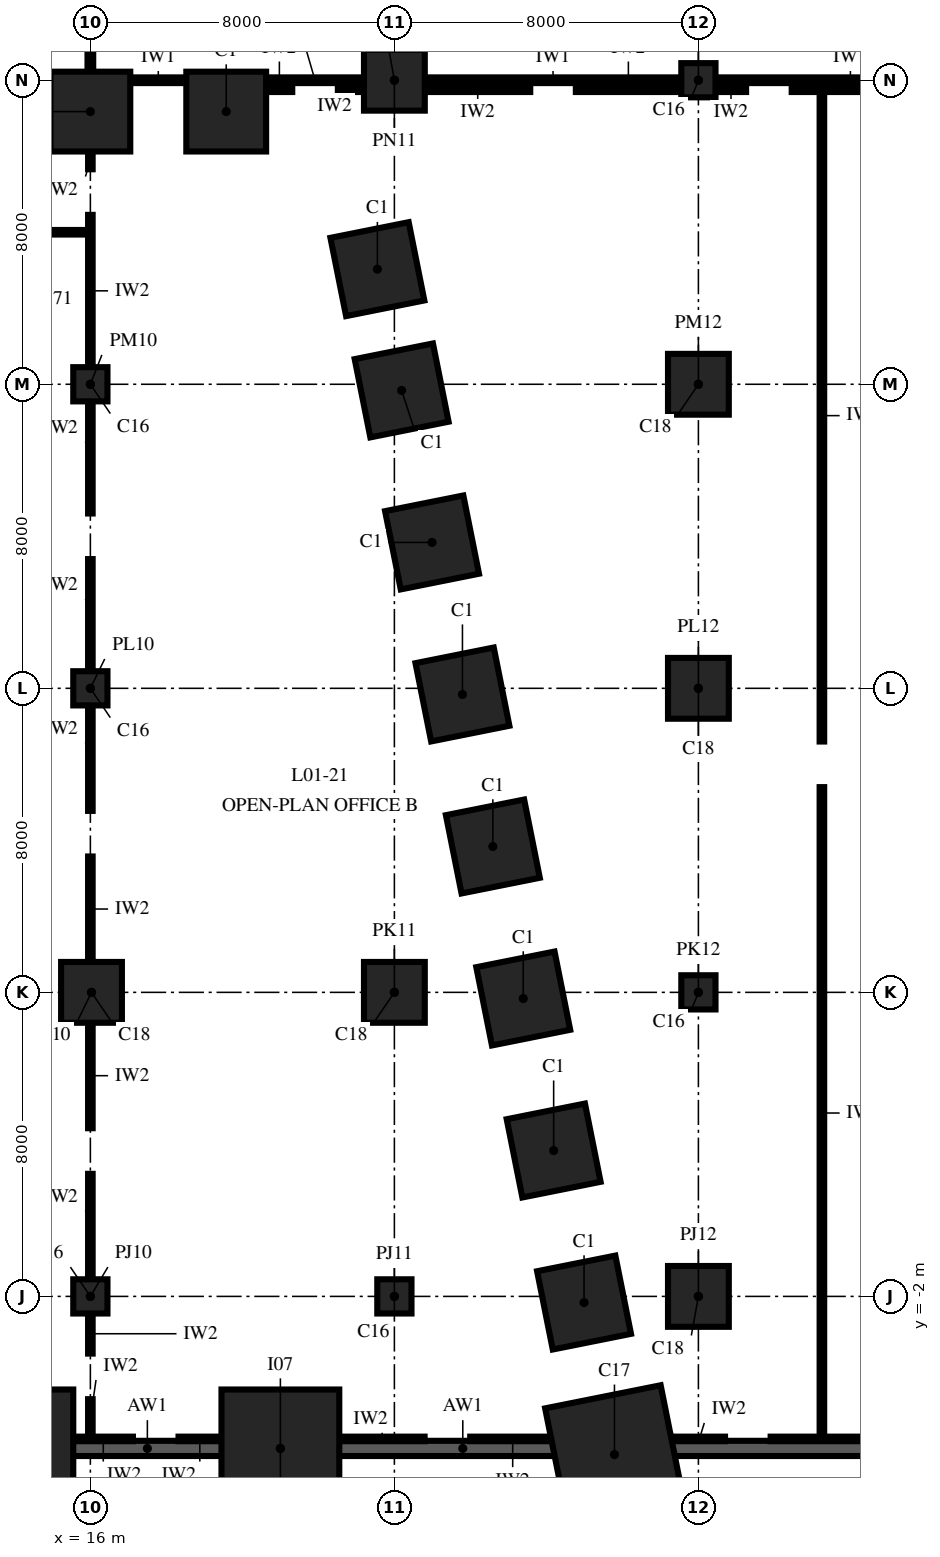
"""IFC4 building model, lengths in metres.
Left out: names, types, materials, properties, quantities, classifications, styles, units other than length and angle.
Written with IfcOpenShell. Run it as: python <this file> out.ifc"""

import sys

from ifc_helpers import new_model, si_unit, direction, frame, frame_2d, origin, origin_2d, place, context, subcontext, project, spatial, rectangle, extrude, element, save


model = new_model("IFC4")
c1 = context("Model", 3, precision=1e-05, world=origin(), true_north=direction((0.0, 1.0)))
c2 = subcontext(c1, "Body", "Model", "MODEL_VIEW")
j1 = project(units=[si_unit("LENGTHUNIT", "METRE"), si_unit("PLANEANGLEUNIT", "RADIAN")], contexts=[c1])
p1 = place(None, origin())
s1 = spatial("IfcSite", under=j1, at=p1, CompositionType="ELEMENT")
p2 = place(p1, origin())
s2 = spatial("IfcBuilding", under=s1, at=p2, CompositionType="ELEMENT")
p3 = place(p2, frame((0.0, 0.0, 6.0)))
s3 = spatial("IfcBuildingStorey", under=s2, at=p3, CompositionType="ELEMENT", Elevation=6.0)
p4 = place(p3, frame((29.791, -6.162, 0.0), z_axis=(0.0, 0.0, 1.0), x_axis=(-0.196116135138, 0.980580675691, 0.0)))
e1 = element("IfcColumn", 1, at=p4, inside=s3, PredefinedType="COLUMN", context=c2, shape_type="SweptSolid", body=[
    extrude(rectangle(XDim=3.1, YDim=3.1, at=origin_2d()), origin(), (0.0, 0.0, 1.0), 6.0),
])
for number, where, z_axis, x_axis in (
    (2, (28.991, -2.162, 0.0), (0.0, 0.0, 1.0), (-0.196, 0.981, 0.0)),
    (3, (28.191, 1.838, 0.0), (0.0, 0.0, 1.0), (-0.196, 0.981, 0.0)),
    (4, (27.391, 5.838, 0.0), (0.0, 0.0, 1.0), (-0.196, 0.981, 0.0)),
    (5, (26.591, 9.838, 0.0), (0.0, 0.0, 1.0), (-0.196, 0.981, 0.0)),
    (6, (25.791, 13.838, 0.0), (0.0, 0.0, 1.0), (-0.196, 0.981, 0.0)),
    (7, (24.991, 17.838, 0.0), (0.0, 0.0, 1.0), (-0.196, 0.981, 0.0)),
    (8, (24.191, 21.838, 0.0), (0.0, 0.0, 1.0), (-0.196, 0.981, 0.0)),
    (9, (23.553, 25.029, 0.0), (0.0, 0.0, 1.0), (-0.196, 0.981, 0.0)),
    (10, (19.575, 29.175, 0.0), (0.0, 0.0, 1.0), (-1.0, 0.0, 0.0)),
    (11, (16.0, 29.175, 0.0), (0.0, 0.0, 1.0), (-1.0, 0.0, 0.0)),
):
    element("IfcColumn", number, at=place(p3, frame(where, z_axis=z_axis, x_axis=x_axis)), inside=s3, PredefinedType="COLUMN", context=c2, shape_type="SweptSolid", body=[
        extrude(rectangle(XDim=2.1, YDim=2.1, at=origin_2d()), origin(), (0.0, 0.0, 1.0), 6.0),
    ])
for number, where, z_axis, x_axis in (
    (12, (14.0, -6.0, 0.0), (0.0, 0.0, 1.0), (1.0, 0.0, 0.0)),
    (13, (21.0, -6.0, 0.0), (0.0, 0.0, 1.0), (1.0, 0.0, 0.0)),
):
    element("IfcColumn", number, at=place(p3, frame(where, z_axis=z_axis, x_axis=x_axis)), inside=s3, PredefinedType="COLUMN", context=c2, shape_type="SweptSolid", body=[
        extrude(rectangle(XDim=3.1, YDim=3.1, at=origin_2d()), origin(), (0.0, 0.0, 1.0), 6.0),
    ])
p5 = place(p3, frame((16.0, -2.0, 0.0), z_axis=(0.0, 0.0, 1.0), x_axis=(1.0, 0.0, 0.0)))
e14 = element("IfcColumn", 14, at=p5, inside=s3, PredefinedType="COLUMN", context=c2, shape_type="SweptSolid", body=[
    extrude(rectangle(XDim=0.9, YDim=0.9, at=origin_2d()), origin(), (0.0, 0.0, 1.0), 6.0),
])
p6 = place(p3, frame((16.03, 6.0, 0.0), z_axis=(0.0, 0.0, 1.0), x_axis=(1.0, 0.0, 0.0)))
e15 = element("IfcColumn", 15, at=p6, inside=s3, PredefinedType="COLUMN", context=c2, shape_type="SweptSolid", body=[
    extrude(rectangle(XDim=1.6, YDim=1.6, at=origin_2d()), origin(), (0.0, 0.0, 1.0), 6.0),
])
for number, where, z_axis, x_axis in (
    (16, (16.0, 14.0, 0.0), (0.0, 0.0, 1.0), (1.0, 0.0, 0.0)),
    (17, (16.0, 22.0, 0.0), (0.0, 0.0, 1.0), (1.0, 0.0, 0.0)),
    (18, (24.0, -2.0, 0.0), (0.0, 0.0, 1.0), (1.0, 0.0, 0.0)),
):
    element("IfcColumn", number, at=place(p3, frame(where, z_axis=z_axis, x_axis=x_axis)), inside=s3, PredefinedType="COLUMN", context=c2, shape_type="SweptSolid", body=[
        extrude(rectangle(XDim=0.9, YDim=0.9, at=origin_2d()), origin(), (0.0, 0.0, 1.0), 6.0),
    ])
for number, where, z_axis, x_axis in (
    (19, (24.0, 6.0, 0.0), (0.0, 0.0, 1.0), (1.0, 0.0, 0.0)),
    (20, (24.0, 30.0, 0.0), (0.0, 0.0, 1.0), (1.0, 0.0, 0.0)),
    (21, (32.0, -2.0, 0.0), (0.0, 0.0, 1.0), (1.0, 0.0, 0.0)),
):
    element("IfcColumn", number, at=place(p3, frame(where, z_axis=z_axis, x_axis=x_axis)), inside=s3, PredefinedType="COLUMN", context=c2, shape_type="SweptSolid", body=[
        extrude(rectangle(XDim=1.6, YDim=1.6, at=origin_2d()), origin(), (0.0, 0.0, 1.0), 6.0),
    ])
p7 = place(p3, frame((32.0, 6.0, 0.0), z_axis=(0.0, 0.0, 1.0), x_axis=(1.0, 0.0, 0.0)))
e22 = element("IfcColumn", 22, at=p7, inside=s3, PredefinedType="COLUMN", context=c2, shape_type="SweptSolid", body=[
    extrude(rectangle(XDim=0.9, YDim=0.9, at=origin_2d()), origin(), (0.0, 0.0, 1.0), 6.0),
])
for number, where, z_axis, x_axis in (
    (23, (32.0, 14.0, 0.0), (0.0, 0.0, 1.0), (1.0, 0.0, 0.0)),
    (24, (32.0, 22.0, 0.0), (0.0, 0.0, 1.0), (1.0, 0.0, 0.0)),
):
    element("IfcColumn", number, at=place(p3, frame(where, z_axis=z_axis, x_axis=x_axis)), inside=s3, PredefinedType="COLUMN", context=c2, shape_type="SweptSolid", body=[
        extrude(rectangle(XDim=1.6, YDim=1.6, at=origin_2d()), origin(), (0.0, 0.0, 1.0), 6.0),
    ])
p8 = place(p3, frame((32.0, 30.0, 0.0), z_axis=(0.0, 0.0, 1.0), x_axis=(1.0, 0.0, 0.0)))
e25 = element("IfcColumn", 25, at=p8, inside=s3, PredefinedType="COLUMN", context=c2, shape_type="SweptSolid", body=[
    extrude(rectangle(XDim=0.9, YDim=0.9, at=origin_2d()), origin(), (0.0, 0.0, 1.0), 6.0),
])
p9 = place(p3, frame((14.65, -6.0, 0.0), z_axis=(0.0, 0.0, 1.0), x_axis=(1.0, 0.0, 0.0)))
e26 = element("IfcWall", 26, at=p9, inside=s3, PredefinedType="SHEAR", context=c2, shape_type="SweptSolid", body=[
    extrude(rectangle(XDim=5.7, YDim=0.4, at=frame_2d((2.85, 0.0))), origin(), (0.0, 0.0, 1.0), 6.0),
])
p10 = place(p3, frame((21.65, -6.0, 0.0), z_axis=(0.0, 0.0, 1.0), x_axis=(1.0, 0.0, 0.0)))
e27 = element("IfcWall", 27, at=p10, inside=s3, PredefinedType="SHEAR", context=c2, shape_type="SweptSolid", body=[
    extrude(rectangle(XDim=8.3, YDim=0.4, at=frame_2d((4.15, 0.0))), origin(), (0.0, 0.0, 1.0), 6.0),
])
p11 = place(p3, frame((31.25, -6.0, 0.0), z_axis=(0.0, 0.0, 1.0), x_axis=(1.0, 0.0, 0.0)))
e28 = element("IfcWall", 28, at=p11, inside=s3, PredefinedType="SHEAR", context=c2, shape_type="SweptSolid", body=[
    extrude(rectangle(XDim=17.05, YDim=0.4, at=frame_2d((8.525, 0.0))), origin(), (0.0, 0.0, 1.0), 6.0),
])
for number, where, z_axis, x_axis in (
    (29, (16.0, -5.75, 0.0), (0.0, 0.0, 1.0), (0.0, 1.0, 0.0)),
    (30, (16.0, -3.505, 0.0), (0.0, 0.0, 1.0), (0.0, 1.0, 0.0)),
):
    element("IfcWall", number, at=place(p3, frame(where, z_axis=z_axis, x_axis=x_axis)), inside=s3, PredefinedType="PARTITIONING", context=c2, shape_type="SweptSolid", body=[
        extrude(rectangle(XDim=1.045, YDim=0.12, at=frame_2d((0.522, 0.0))), origin(), (0.0, 0.0, 1.0), 5.7),
    ])
p12 = place(p3, frame((16.0, -1.54, 0.0), z_axis=(0.0, 0.0, 1.0), x_axis=(0.0, 1.0, 0.0)))
e31 = element("IfcWall", 31, at=p12, inside=s3, PredefinedType="PARTITIONING", context=c2, shape_type="SweptSolid", body=[
    extrude(rectangle(XDim=2.765, YDim=0.12, at=frame_2d((1.383, 0.0))), origin(), (0.0, 0.0, 1.0), 5.05),
])
for number, where, z_axis, x_axis in (
    (32, (16.0, 2.425, 0.0), (0.0, 0.0, 1.0), (0.0, 1.0, 0.0)),
    (33, (16.0, 6.81, 0.0), (0.0, 0.0, 1.0), (0.0, 1.0, 0.0)),
):
    element("IfcWall", number, at=place(p3, frame(where, z_axis=z_axis, x_axis=x_axis)), inside=s3, PredefinedType="PARTITIONING", context=c2, shape_type="SweptSolid", body=[
        extrude(rectangle(XDim=2.765, YDim=0.12, at=frame_2d((1.382, 0.0))), origin(), (0.0, 0.0, 1.0), 5.05),
    ])
p13 = place(p3, frame((16.0, 10.775, 0.0), z_axis=(0.0, 0.0, 1.0), x_axis=(0.0, 1.0, 0.0)))
e34 = element("IfcWall", 34, at=p13, inside=s3, PredefinedType="PARTITIONING", context=c2, shape_type="SweptSolid", body=[
    extrude(rectangle(XDim=2.765, YDim=0.12, at=frame_2d((1.383, 0.0))), origin(), (0.0, 0.0, 1.0), 5.05),
])
for number, where, z_axis, x_axis in (
    (35, (16.0, 14.46, 0.0), (0.0, 0.0, 1.0), (0.0, 1.0, 0.0)),
    (36, (16.0, 18.6, 0.0), (0.0, 0.0, 1.0), (0.0, 1.0, 0.0)),
):
    element("IfcWall", number, at=place(p3, frame(where, z_axis=z_axis, x_axis=x_axis)), inside=s3, PredefinedType="PARTITIONING", context=c2, shape_type="SweptSolid", body=[
        extrude(rectangle(XDim=2.94, YDim=0.12, at=frame_2d((1.47, 0.0))), origin(), (0.0, 0.0, 1.0), 5.05),
    ])
p14 = place(p3, frame((16.0, 22.46, 0.0), z_axis=(0.0, 0.0, 1.0), x_axis=(0.0, 1.0, 0.0)))
e37 = element("IfcWall", 37, at=p14, inside=s3, PredefinedType="PARTITIONING", context=c2, shape_type="SweptSolid", body=[
    extrude(rectangle(XDim=3.998, YDim=0.12, at=frame_2d((1.999, 0.0))), origin(), (0.0, 0.0, 1.0), 5.7),
])
p15 = place(p3, frame((16.0, 27.657, 0.0), z_axis=(0.0, 0.0, 1.0), x_axis=(0.0, 1.0, 0.0)))
e38 = element("IfcWall", 38, at=p15, inside=s3, PredefinedType="PARTITIONING", context=c2, shape_type="SweptSolid", body=[
    extrude(rectangle(XDim=0.458, YDim=0.12, at=frame_2d((0.229, 0.0))), origin(), (0.0, 0.0, 1.0), 5.7),
])
p16 = place(p3, frame((16.0, 30.235, 0.0), z_axis=(0.0, 0.0, 1.0), x_axis=(0.0, 1.0, 0.0)))
e39 = element("IfcWall", 39, at=p16, inside=s3, PredefinedType="PARTITIONING", context=c2, shape_type="SweptSolid", body=[
    extrude(rectangle(XDim=7.305, YDim=0.15, at=frame_2d((3.652, 0.0))), origin(), (0.0, 0.0, 1.0), 5.7),
])
p17 = place(p16, frame((3.153, 0.0, 0.0)))
e40 = element("IfcOpeningElement", 40, at=p17, cuts=e39, PredefinedType="OPENING", context=c2, shape_type="SweptSolid", body=[
    extrude(rectangle(XDim=1.0, YDim=2.1, at=frame_2d((0.5, 1.05))), frame((0.0, 0.09, 0.0), z_axis=(0.0, -1.0, 0.0), x_axis=(1.0, 0.0, 0.0)), (0.0, 0.0, 1.0), 0.18),
])
for number, where, z_axis, x_axis in (
    (41, (35.25, -5.75, 0.0), (0.0, 0.0, 1.0), (0.0, 1.0, 0.0)),
    (42, (35.25, 12.6, 0.0), (0.0, 0.0, 1.0), (0.0, 1.0, 0.0)),
):
    element("IfcWall", number, at=place(p3, frame(where, z_axis=z_axis, x_axis=x_axis)), inside=s3, PredefinedType="PARTITIONING", context=c2, shape_type="SweptSolid", body=[
        extrude(rectangle(XDim=17.15, YDim=0.12, at=frame_2d((8.575, 0.0))), origin(), (0.0, 0.0, 1.0), 5.7),
    ])
p18 = place(p3, frame((15.56, -5.75, 0.0), z_axis=(0.0, 0.0, 1.0), x_axis=(1.0, 0.0, 0.0)))
e43 = element("IfcWall", 43, at=p18, inside=s3, PredefinedType="PARTITIONING", context=c2, shape_type="SweptSolid", body=[
    extrude(rectangle(XDim=1.56, YDim=0.12, at=frame_2d((0.78, 0.0))), origin(), (0.0, 0.0, 1.0), 5.7),
])
p19 = place(p3, frame((18.32, -5.75, 0.0), z_axis=(0.0, 0.0, 1.0), x_axis=(1.0, 0.0, 0.0)))
e44 = element("IfcWall", 44, at=p19, inside=s3, PredefinedType="PARTITIONING", context=c2, shape_type="SweptSolid", body=[
    extrude(rectangle(XDim=1.12, YDim=0.12, at=frame_2d((0.56, 0.0))), origin(), (0.0, 0.0, 1.0), 5.7),
])
for number, where, z_axis, x_axis in (
    (45, (22.56, -5.75, 0.0), (0.0, 0.0, 1.0), (1.0, 0.0, 0.0)),
    (46, (25.996, -5.75, 0.0), (0.0, 0.0, 1.0), (1.0, 0.0, 0.0)),
):
    element("IfcWall", number, at=place(p3, frame(where, z_axis=z_axis, x_axis=x_axis)), inside=s3, PredefinedType="PARTITIONING", context=c2, shape_type="SweptSolid", body=[
        extrude(rectangle(XDim=2.235, YDim=0.12, at=frame_2d((1.118, 0.0))), origin(), (0.0, 0.0, 1.0), 5.7),
    ])
p20 = place(p3, frame((31.351, -5.75, 0.0), z_axis=(0.0, 0.0, 1.0), x_axis=(1.0, 0.0, 0.0)))
e47 = element("IfcWall", 47, at=p20, inside=s3, PredefinedType="PARTITIONING", context=c2, shape_type="SweptSolid", body=[
    extrude(rectangle(XDim=1.349, YDim=0.12, at=frame_2d((0.675, 0.0))), origin(), (0.0, 0.0, 1.0), 5.7),
])
p21 = place(p3, frame((33.9, -5.75, 0.0), z_axis=(0.0, 0.0, 1.0), x_axis=(1.0, 0.0, 0.0)))
e48 = element("IfcWall", 48, at=p21, inside=s3, PredefinedType="PARTITIONING", context=c2, shape_type="SweptSolid", body=[
    extrude(rectangle(XDim=21.85, YDim=0.12, at=frame_2d((10.925, 0.0))), origin(), (0.0, 0.0, 1.0), 5.7),
])
p22 = place(p3, frame((0.6, 26.0, 0.0), z_axis=(0.0, 0.0, 1.0), x_axis=(1.0, 0.0, 0.0)))
e49 = element("IfcWall", 49, at=p22, inside=s3, PredefinedType="PARTITIONING", context=c2, shape_type="SweptSolid", body=[
    extrude(rectangle(XDim=15.4, YDim=0.12, at=frame_2d((7.7, 0.0))), origin(), (0.0, 0.0, 1.0), 5.7),
])
for number, where, z_axis, x_axis in (
    (50, (20.635, 29.75, 0.0), (0.0, 0.0, 1.0), (1.0, 0.0, 0.0)),
    (51, (22.512, 29.75, 0.0), (0.0, 0.0, 1.0), (1.0, 0.0, 0.0)),
):
    element("IfcWall", number, at=place(p3, frame(where, z_axis=z_axis, x_axis=x_axis)), inside=s3, PredefinedType="PARTITIONING", context=c2, shape_type="SweptSolid", body=[
        extrude(rectangle(XDim=0.677, YDim=0.12, at=frame_2d((0.339, 0.0))), origin(), (0.0, 0.0, 1.0), 5.7),
    ])
p23 = place(p3, frame((24.81, 29.75, 0.0), z_axis=(0.0, 0.0, 1.0), x_axis=(1.0, 0.0, 0.0)))
e52 = element("IfcWall", 52, at=p23, inside=s3, PredefinedType="PARTITIONING", context=c2, shape_type="SweptSolid", body=[
    extrude(rectangle(XDim=2.765, YDim=0.12, at=frame_2d((1.382, 0.0))), origin(), (0.0, 0.0, 1.0), 5.05),
])
p24 = place(p3, frame((28.775, 29.75, 0.0), z_axis=(0.0, 0.0, 1.0), x_axis=(1.0, 0.0, 0.0)))
e53 = element("IfcWall", 53, at=p24, inside=s3, PredefinedType="PARTITIONING", context=c2, shape_type="SweptSolid", body=[
    extrude(rectangle(XDim=2.765, YDim=0.12, at=frame_2d((1.383, 0.0))), origin(), (0.0, 0.0, 1.0), 5.05),
])
p25 = place(p3, frame((32.46, 29.75, 0.0), z_axis=(0.0, 0.0, 1.0), x_axis=(1.0, 0.0, 0.0)))
e54 = element("IfcWall", 54, at=p25, inside=s3, PredefinedType="PARTITIONING", context=c2, shape_type="SweptSolid", body=[
    extrude(rectangle(XDim=0.795, YDim=0.12, at=frame_2d((0.397, 0.0))), origin(), (0.0, 0.0, 1.0), 5.05),
])
p26 = place(p3, frame((34.455, 29.75, 0.0), z_axis=(0.0, 0.0, 1.0), x_axis=(1.0, 0.0, 0.0)))
e55 = element("IfcWall", 55, at=p26, inside=s3, PredefinedType="PARTITIONING", context=c2, shape_type="SweptSolid", body=[
    extrude(rectangle(XDim=5.085, YDim=0.12, at=frame_2d((2.542, 0.0))), origin(), (0.0, 0.0, 1.0), 5.05),
])
p27 = place(p3, frame((17.06, 30.0, 0.0), z_axis=(0.0, 0.0, 1.0), x_axis=(1.0, 0.0, 0.0)))
e56 = element("IfcWall", 56, at=p27, inside=s3, PredefinedType="PARTITIONING", context=c2, shape_type="SweptSolid", body=[
    extrude(rectangle(XDim=1.455, YDim=0.15, at=frame_2d((0.728, 0.0))), origin(), (0.0, 0.0, 1.0), 5.7),
])
p28 = place(p3, frame((20.635, 30.0, 0.0), z_axis=(0.0, 0.0, 1.0), x_axis=(1.0, 0.0, 0.0)))
e57 = element("IfcWall", 57, at=p28, inside=s3, PredefinedType="PARTITIONING", context=c2, shape_type="SweptSolid", body=[
    extrude(rectangle(XDim=2.555, YDim=0.15, at=frame_2d((1.277, 0.0))), origin(), (0.0, 0.0, 1.0), 5.7),
])
p29 = place(p3, frame((24.81, 30.0, 0.0), z_axis=(0.0, 0.0, 1.0), x_axis=(1.0, 0.0, 0.0)))
e58 = element("IfcWall", 58, at=p29, inside=s3, PredefinedType="PARTITIONING", context=c2, shape_type="SweptSolid", body=[
    extrude(rectangle(XDim=6.73, YDim=0.15, at=frame_2d((3.365, 0.0))), origin(), (0.0, 0.0, 1.0), 5.05),
])
p30 = place(p3, frame((32.46, 30.0, 0.0), z_axis=(0.0, 0.0, 1.0), x_axis=(1.0, 0.0, 0.0)))
e59 = element("IfcWall", 59, at=p30, inside=s3, PredefinedType="PARTITIONING", context=c2, shape_type="SweptSolid", body=[
    extrude(rectangle(XDim=7.08, YDim=0.15, at=frame_2d((3.54, 0.0))), origin(), (0.0, 0.0, 1.0), 5.05),
])
save(model, sys.argv[1])
